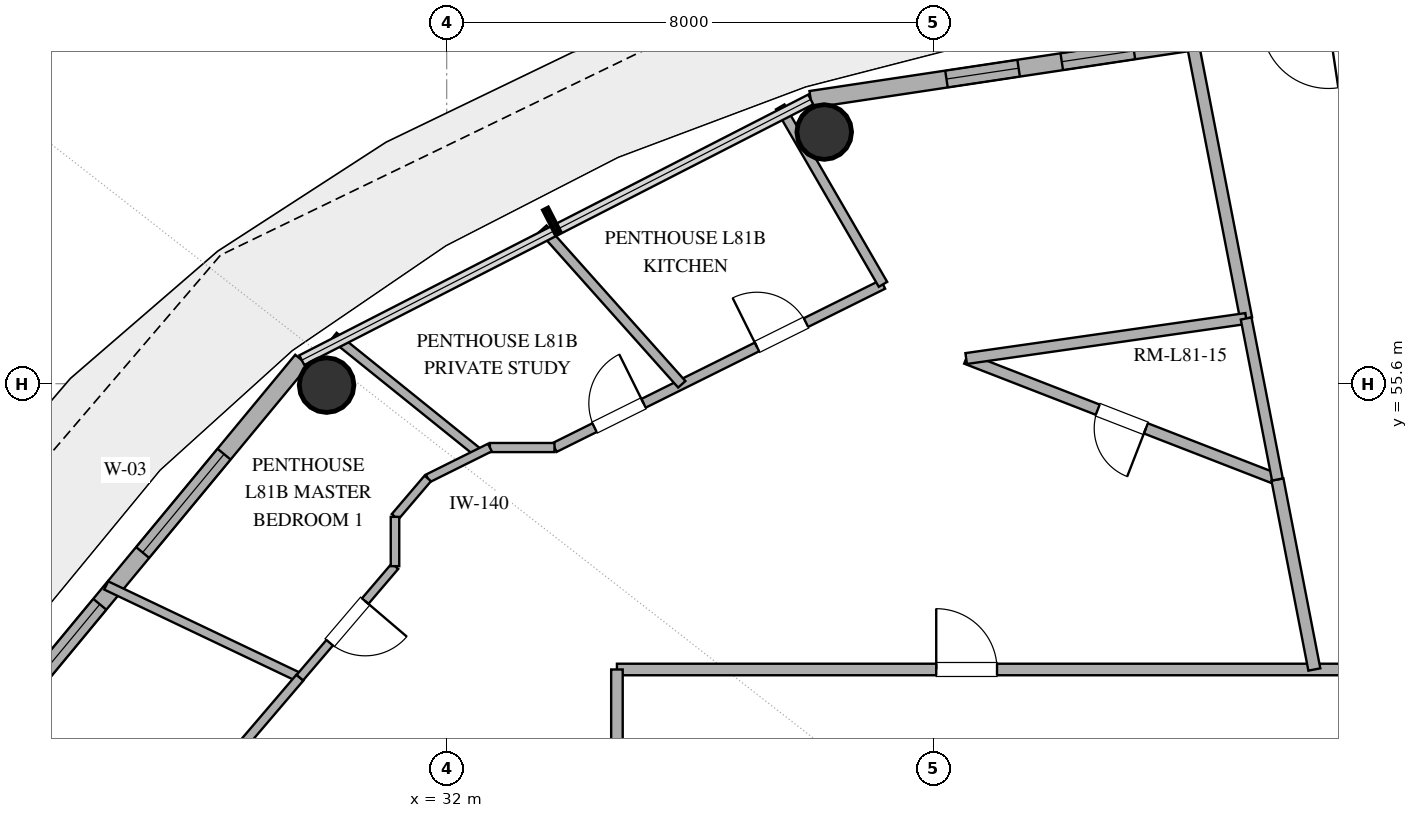
"""IFC4 building model, lengths in metres.
Left out: names, types, materials, properties, quantities, classifications, styles, units other than length and angle.
Written with IfcOpenShell. Run it as: python <this file> out.ifc"""

import sys

from ifc_helpers import new_model, si_unit, direction, frame, frame_2d, origin, origin_2d, place, context, subcontext, project, spatial, rectangle, hollow_circle, extrude, element, fill, save


model = new_model("IFC4")
c1 = context("Model", 3, precision=1e-05, world=origin(), true_north=direction((0.0, 1.0)))
c2 = subcontext(c1, "Body", "Model", "MODEL_VIEW")
j1 = project(units=[si_unit("LENGTHUNIT", "METRE"), si_unit("PLANEANGLEUNIT", "RADIAN")], contexts=[c1])
p1 = place(None, origin())
s1 = spatial("IfcSite", under=j1, at=p1, CompositionType="ELEMENT")
p2 = place(p1, origin())
s2 = spatial("IfcBuilding", under=s1, at=p2, CompositionType="ELEMENT")
p3 = place(p2, frame((0.0, 0.0, 312.6)))
s3 = spatial("IfcBuildingStorey", under=s2, at=p3, CompositionType="ELEMENT", Elevation=312.6)
for number, where, z_axis, x_axis in (
    (1, (38.209, 59.739, 0.0), (0.0, 0.0, 1.0), (1.0, 0.0, 0.0)),
    (2, (30.025, 55.576, 0.0), (0.0, 0.0, 1.0), (1.0, 0.0, 0.0)),
):
    element("IfcColumn", number, at=place(p3, frame(where, z_axis=z_axis, x_axis=x_axis)), inside=s3, PredefinedType="COLUMN", context=c2, shape_type="SweptSolid", body=[
        extrude(hollow_circle(Radius=0.45, WallThickness=0.025, at=origin_2d()), origin(), (0.0, 0.0, 1.0), 3.64),
    ])
p4 = place(p3, frame((48.0, 61.78, 0.0), z_axis=(0.0, 0.0, 1.0), x_axis=(-0.988882522213, -0.148698881169, 0.0)))
e3 = element("IfcWall", 3, at=p4, inside=s3, PredefinedType="SOLIDWALL", context=c2, shape_type="SweptSolid", body=[
    extrude(rectangle(XDim=10.125, YDim=0.28, at=frame_2d((5.062, 0.0))), origin(), (0.0, 0.0, 1.0), 3.64),
])
p5 = place(p4, frame((1.516, 0.0, 0.0)))
e4 = element("IfcOpeningElement", 4, at=p5, cuts=e3, PredefinedType="OPENING", context=c2, shape_type="SweptSolid", body=[
    extrude(rectangle(XDim=1.1, YDim=2.25, at=frame_2d((0.55, 1.125))), frame((0.0, 0.15, 0.0), z_axis=(0.0, -1.0, 0.0), x_axis=(1.0, 0.0, 0.0)), (0.0, 0.0, 1.0), 0.3),
])
p6 = place(p4, frame((4.75, 0.0, 0.85)))
e5 = element("IfcOpeningElement", 5, at=p6, cuts=e3, PredefinedType="OPENING", context=c2, shape_type="SweptSolid", body=[
    extrude(rectangle(XDim=1.2, YDim=1.6, at=frame_2d((0.6, 0.8))), frame((0.0, 0.15, 0.0), z_axis=(0.0, -1.0, 0.0), x_axis=(1.0, 0.0, 0.0)), (0.0, 0.0, 1.0), 0.3),
])
p7 = place(p4, frame((6.668, 0.0, 0.85)))
e6 = element("IfcOpeningElement", 6, at=p7, cuts=e3, PredefinedType="OPENING", context=c2, shape_type="SweptSolid", body=[
    extrude(rectangle(XDim=1.2, YDim=1.6, at=frame_2d((0.6, 0.8))), frame((0.0, 0.15, 0.0), z_axis=(0.0, -1.0, 0.0), x_axis=(1.0, 0.0, 0.0)), (0.0, 0.0, 1.0), 0.3),
])
p8 = place(p3, frame((29.617, 55.987, 0.0), z_axis=(0.0, 0.0, 1.0), x_axis=(-0.63761509934, -0.770355103243, 0.0)))
e7 = element("IfcWall", 7, at=p8, inside=s3, PredefinedType="SOLIDWALL", context=c2, shape_type="SweptSolid", body=[
    extrude(rectangle(XDim=8.33, YDim=0.28, at=frame_2d((4.165, 0.0))), origin(), (0.0, 0.0, 1.0), 3.64),
])
p9 = place(p8, frame((2.006, 0.0, 0.85)))
e8 = element("IfcOpeningElement", 8, at=p9, cuts=e7, PredefinedType="OPENING", context=c2, shape_type="SweptSolid", body=[
    extrude(rectangle(XDim=2.1, YDim=2.2, at=frame_2d((1.05, 1.1))), frame((0.0, 0.15, 0.0), z_axis=(0.0, -1.0, 0.0), x_axis=(1.0, 0.0, 0.0)), (0.0, 0.0, 1.0), 0.3),
])
p10 = place(p8, frame((5.211, 0.0, 0.85)))
e9 = element("IfcOpeningElement", 9, at=p10, cuts=e7, PredefinedType="OPENING", context=c2, shape_type="SweptSolid", body=[
    extrude(rectangle(XDim=1.5, YDim=2.0, at=frame_2d((0.75, 1.0))), frame((0.0, 0.15, 0.0), z_axis=(0.0, -1.0, 0.0), x_axis=(1.0, 0.0, 0.0)), (0.0, 0.0, 1.0), 0.3),
])
p11 = place(p3, frame((34.8, 50.9, 0.0), z_axis=(0.0, 0.0, 1.0), x_axis=(1.0, 0.0, 0.0)))
e10 = element("IfcWall", 10, at=p11, inside=s3, PredefinedType="PARTITIONING", context=c2, shape_type="SweptSolid", body=[
    extrude(rectangle(XDim=26.4, YDim=0.19, at=frame_2d((13.2, 0.0))), origin(), (0.0, 0.0, 1.0), 2.34),
])
p12 = place(p11, frame((18.419, 0.0, 0.0)))
e11 = element("IfcOpeningElement", 11, at=p12, cuts=e10, PredefinedType="OPENING", context=c2, shape_type="SweptSolid", body=[
    extrude(rectangle(XDim=1.0, YDim=2.2, at=frame_2d((0.5, 1.1))), frame((0.0, 0.105, 0.0), z_axis=(0.0, -1.0, 0.0), x_axis=(1.0, 0.0, 0.0)), (0.0, 0.0, 1.0), 0.21),
])
p13 = place(p11, frame((5.251, 0.0, 0.0)))
e12 = element("IfcOpeningElement", 12, at=p13, cuts=e10, PredefinedType="OPENING", context=c2, shape_type="SweptSolid", body=[
    extrude(rectangle(XDim=1.0, YDim=2.2, at=frame_2d((0.5, 1.1))), frame((0.0, 0.105, 0.0), z_axis=(0.0, -1.0, 0.0), x_axis=(1.0, 0.0, 0.0)), (0.0, 0.0, 1.0), 0.21),
])
p14 = place(p3, frame((34.8, 34.0, 0.0), z_axis=(0.0, 0.0, 1.0), x_axis=(0.0, 1.0, 0.0)))
e13 = element("IfcWall", 13, at=p14, inside=s3, PredefinedType="PARTITIONING", context=c2, shape_type="SweptSolid", body=[
    extrude(rectangle(XDim=16.9, YDim=0.19, at=frame_2d((8.45, 0.0))), origin(), (0.0, 0.0, 1.0), 2.34),
])
p15 = place(p14, frame((2.217, 0.0, 0.0)))
e14 = element("IfcOpeningElement", 14, at=p15, cuts=e13, PredefinedType="OPENING", context=c2, shape_type="SweptSolid", body=[
    extrude(rectangle(XDim=1.0, YDim=2.2, at=frame_2d((0.5, 1.1))), frame((0.0, 0.105, 0.0), z_axis=(0.0, -1.0, 0.0), x_axis=(1.0, 0.0, 0.0)), (0.0, 0.0, 1.0), 0.21),
])
p16 = place(p3, frame((45.663, 54.024, 0.0), z_axis=(0.0, 0.0, 1.0), x_axis=(-0.932122259713, 0.36214374625, 0.0)))
e15 = element("IfcWall", 15, at=p16, inside=s3, PredefinedType="PLUMBINGWALL", context=c2, shape_type="SweptSolid", body=[
    extrude(rectangle(XDim=5.492, YDim=0.18, at=frame_2d((2.746, 0.0))), origin(), (0.0, 0.0, 1.0), 2.34),
])
p17 = place(p16, frame((2.321, 0.0, 0.0)))
e16 = element("IfcOpeningElement", 16, at=p17, cuts=e15, PredefinedType="OPENING", context=c2, shape_type="SweptSolid", body=[
    extrude(rectangle(XDim=0.85, YDim=2.1, at=frame_2d((0.425, 1.05))), frame((0.0, 0.1, 0.0), z_axis=(0.0, -1.0, 0.0), x_axis=(1.0, 0.0, 0.0)), (0.0, 0.0, 1.0), 0.2),
])
p18 = place(p3, frame((44.241, 61.336, 0.0), z_axis=(0.0, 0.0, 1.0), x_axis=(0.190846277625, -0.981619935778, 0.0)))
e17 = element("IfcWall", 17, at=p18, inside=s3, PredefinedType="PARTITIONING", context=c2, shape_type="SweptSolid", body=[
    extrude(rectangle(XDim=4.751, YDim=0.2, at=frame_2d((2.375, 0.0))), origin(), (0.0, 0.0, 1.0), 2.34),
])
p19 = place(p3, frame((40.544, 56.013, 0.0), z_axis=(0.0, 0.0, 1.0), x_axis=(0.989914822191, 0.141663844385, 0.0)))
e18 = element("IfcWall", 18, at=p19, inside=s3, PredefinedType="PLUMBINGWALL", context=c2, shape_type="SweptSolid", body=[
    extrude(rectangle(XDim=4.651, YDim=0.18, at=frame_2d((2.326, 0.0))), origin(), (0.0, 0.0, 1.0), 2.34),
])
p20 = place(p3, frame((33.773, 54.55, 0.0), z_axis=(0.0, 0.0, 1.0), x_axis=(0.895589779493, 0.444880823219, 0.0)))
e19 = element("IfcWall", 19, at=p20, inside=s3, PredefinedType="PLUMBINGWALL", context=c2, shape_type="SweptSolid", body=[
    extrude(rectangle(XDim=6.032, YDim=0.16, at=frame_2d((3.016, 0.0))), origin(), (0.0, 0.0, 1.0), 2.34),
])
p21 = place(p20, frame((3.718, 0.0, 0.0)))
e20 = element("IfcOpeningElement", 20, at=p21, cuts=e19, PredefinedType="OPENING", context=c2, shape_type="SweptSolid", body=[
    extrude(rectangle(XDim=0.9, YDim=2.1, at=frame_2d((0.45, 1.05))), frame((0.0, 0.09, 0.0), z_axis=(0.0, -1.0, 0.0), x_axis=(1.0, 0.0, 0.0)), (0.0, 0.0, 1.0), 0.18),
])
p22 = place(p20, frame((0.735, 0.0, 0.0)))
e21 = element("IfcOpeningElement", 21, at=p22, cuts=e19, PredefinedType="OPENING", context=c2, shape_type="SweptSolid", body=[
    extrude(rectangle(XDim=0.9, YDim=2.1, at=frame_2d((0.45, 1.05))), frame((0.0, 0.09, 0.0), z_axis=(0.0, -1.0, 0.0), x_axis=(1.0, 0.0, 0.0)), (0.0, 0.0, 1.0), 0.18),
])
p23 = place(p3, frame((26.4, 52.282, 0.0), z_axis=(0.0, 0.0, 1.0), x_axis=(0.902924474477, -0.429799247777, 0.0)))
e22 = element("IfcWall", 22, at=p23, inside=s3, PredefinedType="PARTITIONING", context=c2, shape_type="SweptSolid", body=[
    extrude(rectangle(XDim=3.528, YDim=0.15, at=frame_2d((1.764, 0.0))), origin(), (0.0, 0.0, 1.0), 2.34),
])
p24 = place(p3, frame((35.866, 55.59, 0.0), z_axis=(0.0, 0.0, 1.0), x_axis=(-0.665966254354, 0.745981868453, 0.0)))
e23 = element("IfcWall", 23, at=p24, inside=s3, PredefinedType="PLUMBINGWALL", context=c2, shape_type="SweptSolid", body=[
    extrude(rectangle(XDim=3.429, YDim=0.16, at=frame_2d((1.715, 0.0))), origin(), (0.0, 0.0, 1.0), 2.34),
])
p25 = place(p3, frame((39.176, 57.234, 0.0), z_axis=(0.0, 0.0, 1.0), x_axis=(-0.501221763984, 0.865318867996, 0.0)))
e24 = element("IfcWall", 24, at=p25, inside=s3, PredefinedType="PLUMBINGWALL", context=c2, shape_type="SweptSolid", body=[
    extrude(rectangle(XDim=3.372, YDim=0.16, at=frame_2d((1.686, 0.0))), origin(), (0.0, 0.0, 1.0), 2.34),
])
p26 = place(p3, frame((29.585, 50.766, 0.0), z_axis=(0.0, 0.0, 1.0), x_axis=(-0.649223419945, -0.760597759, 0.0)))
e25 = element("IfcWall", 25, at=p26, inside=s3, PredefinedType="PARTITIONING", context=c2, shape_type="SweptSolid", body=[
    extrude(rectangle(XDim=3.183, YDim=0.15, at=frame_2d((1.591, 0.0))), origin(), (0.0, 0.0, 1.0), 2.34),
])
p27 = place(p3, frame((45.663, 54.024, 0.0), z_axis=(0.0, 0.0, 1.0), x_axis=(0.190832705503, -0.981622574369, 0.0)))
e26 = element("IfcWall", 26, at=p27, inside=s3, PredefinedType="PARTITIONING", context=c2, shape_type="SweptSolid", body=[
    extrude(rectangle(XDim=3.183, YDim=0.2, at=frame_2d((1.592, 0.0))), origin(), (0.0, 0.0, 1.0), 2.34),
])
p28 = place(p3, frame((30.143, 56.379, 0.0), z_axis=(0.0, 0.0, 1.0), x_axis=(0.778865360092, -0.627191159734, 0.0)))
e27 = element("IfcWall", 27, at=p28, inside=s3, PredefinedType="PARTITIONING", context=c2, shape_type="SweptSolid", body=[
    extrude(rectangle(XDim=3.062, YDim=0.15, at=frame_2d((1.531, 0.0))), origin(), (0.0, 0.0, 1.0), 2.34),
])
p29 = place(p3, frame((45.148, 56.672, 0.0), z_axis=(0.0, 0.0, 1.0), x_axis=(0.19071702476, -0.981645056253, 0.0)))
e28 = element("IfcWall", 28, at=p29, inside=s3, PredefinedType="PLUMBINGWALL", context=c2, shape_type="SweptSolid", body=[
    extrude(rectangle(XDim=2.697, YDim=0.18, at=frame_2d((1.349, 0.0))), origin(), (0.0, 0.0, 1.0), 2.34),
])
p30 = place(p3, frame((31.15, 52.599, 0.0), z_axis=(0.0, 0.0, 1.0), x_axis=(-0.649188051026, -0.760627947426, 0.0)))
e29 = element("IfcWall", 29, at=p30, inside=s3, PredefinedType="PARTITIONING", context=c2, shape_type="SweptSolid", body=[
    extrude(rectangle(XDim=2.41, YDim=0.14, at=frame_2d((1.205, 0.0))), origin(), (0.0, 0.0, 1.0), 2.34),
])
p31 = place(p30, frame((0.755, 0.0, 0.0)))
e30 = element("IfcOpeningElement", 30, at=p31, cuts=e29, PredefinedType="OPENING", context=c2, shape_type="SweptSolid", body=[
    extrude(rectangle(XDim=0.9, YDim=2.1, at=frame_2d((0.45, 1.05))), frame((0.0, 0.08, 0.0), z_axis=(0.0, -1.0, 0.0), x_axis=(1.0, 0.0, 0.0)), (0.0, 0.0, 1.0), 0.16),
])
p32 = place(p3, frame((32.711, 54.55, 0.0), z_axis=(0.0, 0.0, 1.0), x_axis=(1.0, 0.0, 0.0)))
e31 = element("IfcWall", 31, at=p32, inside=s3, PredefinedType="PARTITIONING", context=c2, shape_type="SweptSolid", body=[
    extrude(rectangle(XDim=1.062, YDim=0.15, at=frame_2d((0.531, 0.0))), origin(), (0.0, 0.0, 1.0), 2.34),
])
p33 = place(p3, frame((32.711, 54.55, 0.0), z_axis=(0.0, 0.0, 1.0), x_axis=(-0.895409226325, -0.445244109912, 0.0)))
e32 = element("IfcWall", 32, at=p33, inside=s3, PredefinedType="PARTITIONING", context=c2, shape_type="SweptSolid", body=[
    extrude(rectangle(XDim=1.141, YDim=0.14, at=frame_2d((0.571, 0.0))), origin(), (0.0, 0.0, 1.0), 2.34),
])
p34 = place(p3, frame((31.689, 54.042, 0.0), z_axis=(0.0, 0.0, 1.0), x_axis=(-0.649191857323, -0.760624698774, 0.0)))
e33 = element("IfcWall", 33, at=p34, inside=s3, PredefinedType="PARTITIONING", context=c2, shape_type="SweptSolid", body=[
    extrude(rectangle(XDim=0.83, YDim=0.14, at=frame_2d((0.415, 0.0))), origin(), (0.0, 0.0, 1.0), 2.34),
])
p35 = place(p3, frame((31.15, 53.41, 0.0), z_axis=(0.0, 0.0, 1.0), x_axis=(0.0, -1.0, 0.0)))
e34 = element("IfcWall", 34, at=p35, inside=s3, PredefinedType="PARTITIONING", context=c2, shape_type="SweptSolid", body=[
    extrude(rectangle(XDim=0.812, YDim=0.14, at=frame_2d((0.406, 0.0))), origin(), (0.0, 0.0, 1.0), 2.34),
])
p36 = place(p6, origin())
e35 = element("IfcWindow", 35, at=p36, inside=s3, PartitioningType="SINGLE_PANEL", PredefinedType="WINDOW", context=c2, shape_type="SweptSolid", body=[
    extrude(rectangle(XDim=1.2, YDim=1.6, at=frame_2d((0.6, 0.8))), frame((0.0, 0.03, 0.0), z_axis=(0.0, -1.0, 0.0), x_axis=(1.0, 0.0, 0.0)), (0.0, 0.0, 1.0), 0.06),
])
fill(e5, e35)
p37 = place(p7, origin())
e36 = element("IfcWindow", 36, at=p37, inside=s3, PartitioningType="SINGLE_PANEL", PredefinedType="WINDOW", context=c2, shape_type="SweptSolid", body=[
    extrude(rectangle(XDim=1.2, YDim=1.6, at=frame_2d((0.6, 0.8))), frame((0.0, 0.03, 0.0), z_axis=(0.0, -1.0, 0.0), x_axis=(1.0, 0.0, 0.0)), (0.0, 0.0, 1.0), 0.06),
])
fill(e6, e36)
p38 = place(p9, origin())
e37 = element("IfcWindow", 37, at=p38, inside=s3, PartitioningType="SINGLE_PANEL", PredefinedType="WINDOW", context=c2, shape_type="SweptSolid", body=[
    extrude(rectangle(XDim=2.1, YDim=2.2, at=frame_2d((1.05, 1.1))), frame((0.0, 0.03, 0.0), z_axis=(0.0, -1.0, 0.0), x_axis=(1.0, 0.0, 0.0)), (0.0, 0.0, 1.0), 0.06),
])
fill(e8, e37)
p39 = place(p10, origin())
e38 = element("IfcWindow", 38, at=p39, inside=s3, PartitioningType="SINGLE_PANEL", PredefinedType="WINDOW", context=c2, shape_type="SweptSolid", body=[
    extrude(rectangle(XDim=1.5, YDim=2.0, at=frame_2d((0.75, 1.0))), frame((0.0, 0.03, 0.0), z_axis=(0.0, -1.0, 0.0), x_axis=(1.0, 0.0, 0.0)), (0.0, 0.0, 1.0), 0.06),
])
fill(e9, e38)
p40 = place(p13, origin())
e39 = element("IfcDoor", 39, at=p40, inside=s3, OperationType="SINGLE_SWING_LEFT", PredefinedType="DOOR", context=c2, shape_type="SweptSolid", body=[
    extrude(rectangle(XDim=1.0, YDim=2.2, at=frame_2d((0.5, 1.1))), frame((0.0, 0.025, 0.0), z_axis=(0.0, -1.0, 0.0), x_axis=(1.0, 0.0, 0.0)), (0.0, 0.0, 1.0), 0.05),
])
fill(e12, e39)
p41 = place(p17, origin())
e40 = element("IfcDoor", 40, at=p41, inside=s3, OperationType="SINGLE_SWING_LEFT", PredefinedType="DOOR", context=c2, shape_type="SweptSolid", body=[
    extrude(rectangle(XDim=0.85, YDim=2.1, at=frame_2d((0.425, 1.05))), frame((0.0, 0.025, 0.0), z_axis=(0.0, -1.0, 0.0), x_axis=(1.0, 0.0, 0.0)), (0.0, 0.0, 1.0), 0.05),
])
fill(e16, e40)
p42 = place(p21, origin())
e41 = element("IfcDoor", 41, at=p42, inside=s3, OperationType="SINGLE_SWING_LEFT", PredefinedType="DOOR", context=c2, shape_type="SweptSolid", body=[
    extrude(rectangle(XDim=0.9, YDim=2.1, at=frame_2d((0.45, 1.05))), frame((0.0, 0.025, 0.0), z_axis=(0.0, -1.0, 0.0), x_axis=(1.0, 0.0, 0.0)), (0.0, 0.0, 1.0), 0.05),
])
fill(e20, e41)
p43 = place(p22, origin())
e42 = element("IfcDoor", 42, at=p43, inside=s3, OperationType="SINGLE_SWING_RIGHT", PredefinedType="DOOR", context=c2, shape_type="SweptSolid", body=[
    extrude(rectangle(XDim=0.9, YDim=2.1, at=frame_2d((0.45, 1.05))), frame((0.0, 0.025, 0.0), z_axis=(0.0, -1.0, 0.0), x_axis=(1.0, 0.0, 0.0)), (0.0, 0.0, 1.0), 0.05),
])
fill(e21, e42)
p44 = place(p31, origin())
e43 = element("IfcDoor", 43, at=p44, inside=s3, OperationType="SINGLE_SWING_LEFT", PredefinedType="DOOR", context=c2, shape_type="SweptSolid", body=[
    extrude(rectangle(XDim=0.9, YDim=2.1, at=frame_2d((0.45, 1.05))), frame((0.0, 0.025, 0.0), z_axis=(0.0, -1.0, 0.0), x_axis=(1.0, 0.0, 0.0)), (0.0, 0.0, 1.0), 0.05),
])
fill(e30, e43)
save(model, sys.argv[1])
